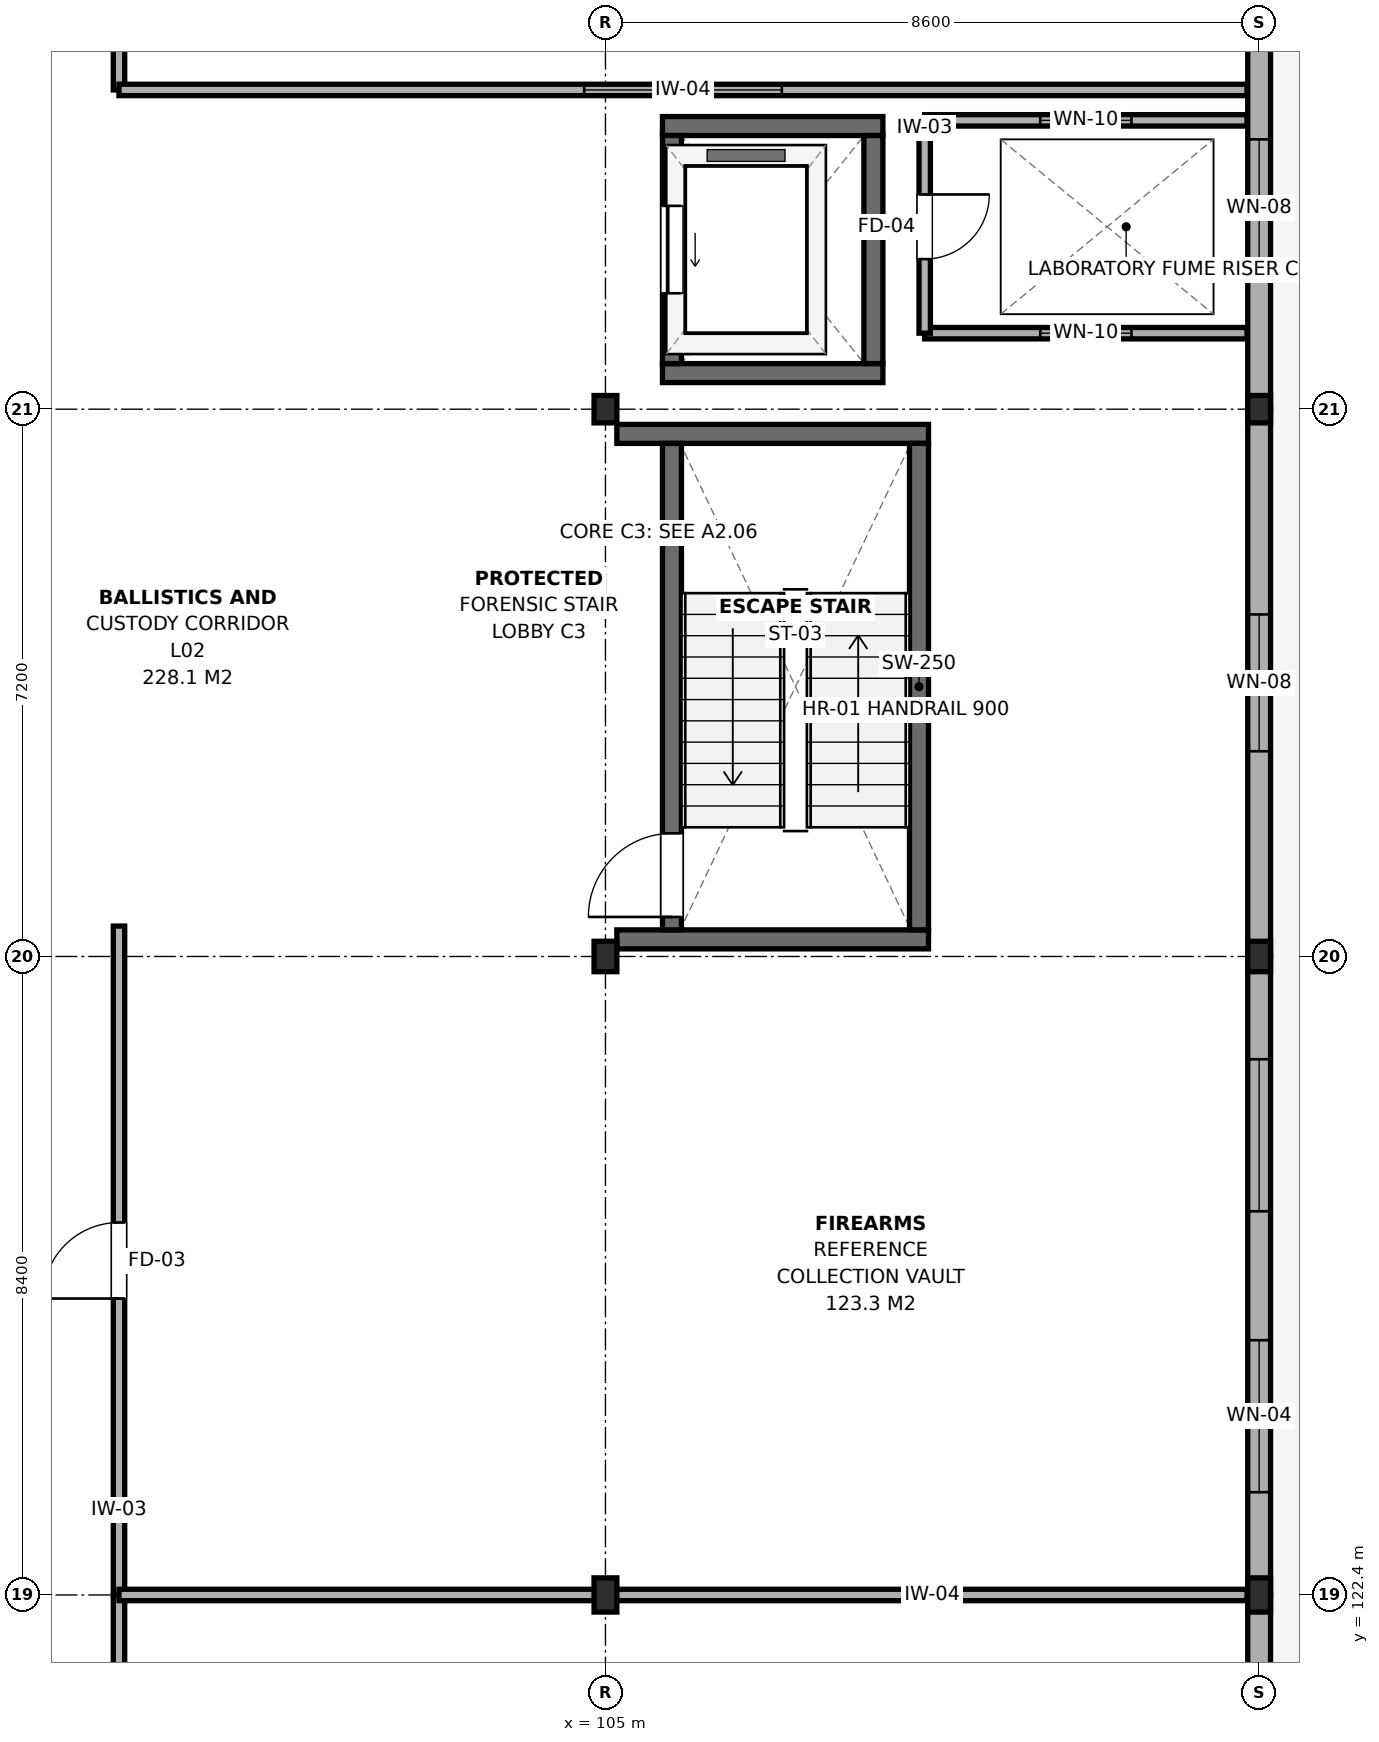
"""IFC4 building model, lengths in metres.
Left out: names, types, materials, properties, quantities, classifications, styles, units other than length and angle.
Written with IfcOpenShell. Run it as: python <this file> out.ifc"""

import sys

from ifc_helpers import new_model, si_unit, direction, frame, frame_2d, origin, origin_2d, place, context, subcontext, project, spatial, rectangle, i_section, extrude, element, fill, save


model = new_model("IFC4")
c1 = context("Model", 3, precision=1e-05, world=origin(), true_north=direction((0.0, 1.0)))
c2 = subcontext(c1, "Body", "Model", "MODEL_VIEW")
j1 = project(units=[si_unit("LENGTHUNIT", "METRE"), si_unit("PLANEANGLEUNIT", "RADIAN")], contexts=[c1])
p1 = place(None, origin())
s1 = spatial("IfcSite", under=j1, at=p1, CompositionType="ELEMENT")
p2 = place(p1, origin())
s2 = spatial("IfcBuilding", under=s1, at=p2, CompositionType="ELEMENT")
p3 = place(p2, frame((0.0, 0.0, 9.0)))
s3 = spatial("IfcBuildingStorey", under=s2, at=p3, CompositionType="ELEMENT", Elevation=9.0)
p4 = place(p3, frame((105.0, 122.4, 0.0), z_axis=(0.0, 0.0, 1.0), x_axis=(1.0, 0.0, 0.0)))
e1 = element("IfcColumn", 1, at=p4, inside=s3, PredefinedType="COLUMN", context=c2, shape_type="SweptSolid", body=[
    extrude(i_section(OverallWidth=0.3, OverallDepth=0.45, WebThickness=0.014, FlangeThickness=0.026, FilletRadius=0.027, at=origin_2d()), origin(), (0.0, 0.0, 1.0), 4.2),
])
p5 = place(p3, frame((105.0, 130.8, 0.0), z_axis=(0.0, 0.0, 1.0), x_axis=(1.0, 0.0, 0.0)))
e2 = element("IfcColumn", 2, at=p5, inside=s3, PredefinedType="COLUMN", context=c2, shape_type="SweptSolid", body=[
    extrude(i_section(OverallWidth=0.3, OverallDepth=0.4, WebThickness=0.013, FlangeThickness=0.024, FilletRadius=0.027, at=origin_2d()), origin(), (0.0, 0.0, 1.0), 4.2),
])
p6 = place(p3, frame((105.0, 138.0, 0.0), z_axis=(0.0, 0.0, 1.0), x_axis=(1.0, 0.0, 0.0)))
e3 = element("IfcColumn", 3, at=p6, inside=s3, PredefinedType="COLUMN", context=c2, shape_type="SweptSolid", body=[
    extrude(i_section(OverallWidth=0.3, OverallDepth=0.36, WebThickness=0.012, FlangeThickness=0.022, FilletRadius=0.027, at=origin_2d()), origin(), (0.0, 0.0, 1.0), 4.2),
])
p7 = place(p3, frame((113.6, 122.4, 0.0), z_axis=(0.0, 0.0, 1.0), x_axis=(1.0, 0.0, 0.0)))
e4 = element("IfcColumn", 4, at=p7, inside=s3, PredefinedType="COLUMN", context=c2, shape_type="SweptSolid", body=[
    extrude(i_section(OverallWidth=0.3, OverallDepth=0.45, WebThickness=0.014, FlangeThickness=0.026, FilletRadius=0.027, at=origin_2d()), origin(), (0.0, 0.0, 1.0), 4.2),
])
p8 = place(p3, frame((113.6, 130.8, 0.0), z_axis=(0.0, 0.0, 1.0), x_axis=(1.0, 0.0, 0.0)))
e5 = element("IfcColumn", 5, at=p8, inside=s3, PredefinedType="COLUMN", context=c2, shape_type="SweptSolid", body=[
    extrude(i_section(OverallWidth=0.3, OverallDepth=0.4, WebThickness=0.013, FlangeThickness=0.024, FilletRadius=0.027, at=origin_2d()), origin(), (0.0, 0.0, 1.0), 4.2),
])
p9 = place(p3, frame((113.6, 138.0, 0.0), z_axis=(0.0, 0.0, 1.0), x_axis=(1.0, 0.0, 0.0)))
e6 = element("IfcColumn", 6, at=p9, inside=s3, PredefinedType="COLUMN", context=c2, shape_type="SweptSolid", body=[
    extrude(i_section(OverallWidth=0.3, OverallDepth=0.36, WebThickness=0.012, FlangeThickness=0.022, FilletRadius=0.027, at=origin_2d()), origin(), (0.0, 0.0, 1.0), 4.2),
])
for number, where, z_axis, x_axis in (
    (7, (105.15, 131.025, 0.0), (0.0, 0.0, 1.0), (1.0, 0.0, 0.0)),
    (8, (105.15, 137.675, 0.0), (0.0, 0.0, 1.0), (1.0, 0.0, 0.0)),
):
    element("IfcWall", number, at=place(p3, frame(where, z_axis=z_axis, x_axis=x_axis)), inside=s3, PredefinedType="SHEAR", context=c2, shape_type="SweptSolid", body=[
        extrude(rectangle(XDim=4.1, YDim=0.25, at=frame_2d((2.05, 0.0))), origin(), (0.0, 0.0, 1.0), 3.98),
    ])
p10 = place(p3, frame((105.875, 131.15, 0.0), z_axis=(0.0, 0.0, 1.0), x_axis=(0.0, 1.0, 0.0)))
e9 = element("IfcWall", 9, at=p10, inside=s3, PredefinedType="SHEAR", context=c2, shape_type="SweptSolid", body=[
    extrude(rectangle(XDim=6.4, YDim=0.25, at=frame_2d((3.2, 0.0))), origin(), (0.0, 0.0, 1.0), 3.98),
])
p11 = place(p10, frame((0.17, 0.0, 0.0)))
e10 = element("IfcOpeningElement", 10, at=p11, cuts=e9, PredefinedType="OPENING", context=c2, shape_type="SweptSolid", body=[
    extrude(rectangle(XDim=1.1, YDim=2.15, at=frame_2d((0.55, 1.075))), frame((0.0, 0.14, 0.0), z_axis=(0.0, -1.0, 0.0), x_axis=(1.0, 0.0, 0.0)), (0.0, 0.0, 1.0), 0.28),
])
p12 = place(p3, frame((109.125, 131.15, 0.0), z_axis=(0.0, 0.0, 1.0), x_axis=(0.0, 1.0, 0.0)))
e11 = element("IfcWall", 11, at=p12, inside=s3, PredefinedType="SHEAR", context=c2, shape_type="SweptSolid", body=[
    extrude(rectangle(XDim=6.4, YDim=0.25, at=frame_2d((3.2, 0.0))), origin(), (0.0, 0.0, 1.0), 3.98),
])
for number, where, z_axis, x_axis in (
    (12, (105.75, 138.475, 0.0), (0.0, 0.0, 1.0), (1.0, 0.0, 0.0)),
    (13, (105.75, 141.725, 0.0), (0.0, 0.0, 1.0), (1.0, 0.0, 0.0)),
):
    element("IfcWall", number, at=place(p3, frame(where, z_axis=z_axis, x_axis=x_axis)), inside=s3, PredefinedType="SHEAR", context=c2, shape_type="SweptSolid", body=[
        extrude(rectangle(XDim=2.9, YDim=0.25, at=frame_2d((1.45, 0.0))), origin(), (0.0, 0.0, 1.0), 3.98),
    ])
p13 = place(p3, frame((105.875, 138.6, 0.0), z_axis=(0.0, 0.0, 1.0), x_axis=(0.0, 1.0, 0.0)))
e14 = element("IfcWall", 14, at=p13, inside=s3, PredefinedType="SHEAR", context=c2, shape_type="SweptSolid", body=[
    extrude(rectangle(XDim=3.0, YDim=0.25, at=frame_2d((1.5, 0.0))), origin(), (0.0, 0.0, 1.0), 3.98),
])
p14 = place(p13, frame((0.925, 0.0, 0.0)))
e15 = element("IfcOpeningElement", 15, at=p14, cuts=e14, PredefinedType="OPENING", context=c2, shape_type="SweptSolid", body=[
    extrude(rectangle(XDim=1.15, YDim=2.15, at=frame_2d((0.575, 1.075))), frame((0.0, 0.14, 0.0), z_axis=(0.0, -1.0, 0.0), x_axis=(1.0, 0.0, 0.0)), (0.0, 0.0, 1.0), 0.28),
])
p15 = place(p3, frame((108.525, 138.6, 0.0), z_axis=(0.0, 0.0, 1.0), x_axis=(0.0, 1.0, 0.0)))
e16 = element("IfcWall", 16, at=p15, inside=s3, PredefinedType="SHEAR", context=c2, shape_type="SweptSolid", body=[
    extrude(rectangle(XDim=3.0, YDim=0.25, at=frame_2d((1.5, 0.0))), origin(), (0.0, 0.0, 1.0), 3.98),
])
p16 = place(p3, frame((113.6, 113.4, 0.0), z_axis=(0.0, 0.0, 1.0), x_axis=(0.0, 1.0, 0.0)))
e17 = element("IfcWall", 17, at=p16, inside=s3, PredefinedType="SOLIDWALL", context=c2, shape_type="SweptSolid", body=[
    extrude(rectangle(XDim=9.0, YDim=0.3, at=frame_2d((4.5, 0.0))), origin(), (0.0, 0.0, 1.0), 3.535),
])
p17 = place(p16, frame((1.52, 0.0, 1.1)))
e18 = element("IfcOpeningElement", 18, at=p17, cuts=e17, PredefinedType="OPENING", context=c2, shape_type="SweptSolid", body=[
    extrude(rectangle(XDim=2.0, YDim=1.8, at=frame_2d((1.0, 0.9))), frame((0.0, 0.165, 0.0), z_axis=(0.0, -1.0, 0.0), x_axis=(1.0, 0.0, 0.0)), (0.0, 0.0, 1.0), 0.33),
])
p18 = place(p16, frame((5.48, 0.0, 1.1)))
e19 = element("IfcOpeningElement", 19, at=p18, cuts=e17, PredefinedType="OPENING", context=c2, shape_type="SweptSolid", body=[
    extrude(rectangle(XDim=2.0, YDim=1.8, at=frame_2d((1.0, 0.9))), frame((0.0, 0.165, 0.0), z_axis=(0.0, -1.0, 0.0), x_axis=(1.0, 0.0, 0.0)), (0.0, 0.0, 1.0), 0.33),
])
p19 = place(p3, frame((113.6, 122.4, 0.0), z_axis=(0.0, 0.0, 1.0), x_axis=(0.0, 1.0, 0.0)))
e20 = element("IfcWall", 20, at=p19, inside=s3, PredefinedType="SOLIDWALL", context=c2, shape_type="SweptSolid", body=[
    extrude(rectangle(XDim=8.4, YDim=0.3, at=frame_2d((4.2, 0.0))), origin(), (0.0, 0.0, 1.0), 3.585),
])
p20 = place(p19, frame((1.352, 0.0, 1.1)))
e21 = element("IfcOpeningElement", 21, at=p20, cuts=e20, PredefinedType="OPENING", context=c2, shape_type="SweptSolid", body=[
    extrude(rectangle(XDim=2.0, YDim=1.8, at=frame_2d((1.0, 0.9))), frame((0.0, 0.165, 0.0), z_axis=(0.0, -1.0, 0.0), x_axis=(1.0, 0.0, 0.0)), (0.0, 0.0, 1.0), 0.33),
])
p21 = place(p19, frame((5.048, 0.0, 1.1)))
e22 = element("IfcOpeningElement", 22, at=p21, cuts=e20, PredefinedType="OPENING", context=c2, shape_type="SweptSolid", body=[
    extrude(rectangle(XDim=2.0, YDim=1.8, at=frame_2d((1.0, 0.9))), frame((0.0, 0.165, 0.0), z_axis=(0.0, -1.0, 0.0), x_axis=(1.0, 0.0, 0.0)), (0.0, 0.0, 1.0), 0.33),
])
p22 = place(p3, frame((113.6, 130.8, 0.0), z_axis=(0.0, 0.0, 1.0), x_axis=(0.0, 1.0, 0.0)))
e23 = element("IfcWall", 23, at=p22, inside=s3, PredefinedType="SOLIDWALL", context=c2, shape_type="SweptSolid", body=[
    extrude(rectangle(XDim=7.2, YDim=0.3, at=frame_2d((3.6, 0.0))), origin(), (0.0, 0.0, 1.0), 3.625),
])
p23 = place(p22, frame((2.7, 0.0, 1.1)))
e24 = element("IfcOpeningElement", 24, at=p23, cuts=e23, PredefinedType="OPENING", context=c2, shape_type="SweptSolid", body=[
    extrude(rectangle(XDim=1.8, YDim=1.2, at=frame_2d((0.9, 0.6))), frame((0.0, 0.165, 0.0), z_axis=(0.0, -1.0, 0.0), x_axis=(1.0, 0.0, 0.0)), (0.0, 0.0, 1.0), 0.33),
])
p24 = place(p3, frame((113.6, 138.0, 0.0), z_axis=(0.0, 0.0, 1.0), x_axis=(0.0, 1.0, 0.0)))
e25 = element("IfcWall", 25, at=p24, inside=s3, PredefinedType="SOLIDWALL", context=c2, shape_type="SweptSolid", body=[
    extrude(rectangle(XDim=7.2, YDim=0.3, at=frame_2d((3.6, 0.0))), origin(), (0.0, 0.0, 1.0), 3.375),
])
p25 = place(p24, frame((1.75, 0.0, 1.1)))
e26 = element("IfcOpeningElement", 26, at=p25, cuts=e25, PredefinedType="OPENING", context=c2, shape_type="SweptSolid", body=[
    extrude(rectangle(XDim=1.8, YDim=1.2, at=frame_2d((0.9, 0.6))), frame((0.0, 0.165, 0.0), z_axis=(0.0, -1.0, 0.0), x_axis=(1.0, 0.0, 0.0)), (0.0, 0.0, 1.0), 0.33),
])
p26 = place(p3, frame((109.2, 139.0, 0.0), z_axis=(0.0, 0.0, 1.0), x_axis=(1.0, 0.0, 0.0)))
e27 = element("IfcWall", 27, at=p26, inside=s3, PredefinedType="PARTITIONING", context=c2, shape_type="SweptSolid", body=[
    extrude(rectangle(XDim=4.24, YDim=0.15, at=frame_2d((2.12, 0.0))), origin(), (0.0, 0.0, 1.0), 3.645),
])
p27 = place(p26, frame((1.52, 0.0, 0.95)))
e28 = element("IfcOpeningElement", 28, at=p27, cuts=e27, PredefinedType="OPENING", context=c2, shape_type="SweptSolid", body=[
    extrude(rectangle(XDim=1.2, YDim=1.5, at=frame_2d((0.6, 0.75))), frame((0.0, 0.09, 0.0), z_axis=(0.0, -1.0, 0.0), x_axis=(1.0, 0.0, 0.0)), (0.0, 0.0, 1.0), 0.18),
])
p28 = place(p3, frame((109.2, 141.8, 0.0), z_axis=(0.0, 0.0, 1.0), x_axis=(1.0, 0.0, 0.0)))
e29 = element("IfcWall", 29, at=p28, inside=s3, PredefinedType="PARTITIONING", context=c2, shape_type="SweptSolid", body=[
    extrude(rectangle(XDim=4.24, YDim=0.15, at=frame_2d((2.12, 0.0))), origin(), (0.0, 0.0, 1.0), 3.645),
])
p29 = place(p28, frame((1.52, 0.0, 0.95)))
e30 = element("IfcOpeningElement", 30, at=p29, cuts=e29, PredefinedType="OPENING", context=c2, shape_type="SweptSolid", body=[
    extrude(rectangle(XDim=1.2, YDim=1.5, at=frame_2d((0.6, 0.75))), frame((0.0, 0.09, 0.0), z_axis=(0.0, -1.0, 0.0), x_axis=(1.0, 0.0, 0.0)), (0.0, 0.0, 1.0), 0.18),
])
p30 = place(p3, frame((109.2, 139.0, 0.0), z_axis=(0.0, 0.0, 1.0), x_axis=(0.0, 1.0, 0.0)))
e31 = element("IfcWall", 31, at=p30, inside=s3, PredefinedType="PARTITIONING", context=c2, shape_type="SweptSolid", body=[
    extrude(rectangle(XDim=2.8, YDim=0.15, at=frame_2d((1.4, 0.0))), origin(), (0.0, 0.0, 1.0), 3.975),
])
p31 = place(p30, frame((0.975, 0.0, 0.0)))
e32 = element("IfcOpeningElement", 32, at=p31, cuts=e31, PredefinedType="OPENING", context=c2, shape_type="SweptSolid", body=[
    extrude(rectangle(XDim=0.85, YDim=2.1, at=frame_2d((0.425, 1.05))), frame((0.0, 0.09, 0.0), z_axis=(0.0, -1.0, 0.0), x_axis=(1.0, 0.0, 0.0)), (0.0, 0.0, 1.0), 0.18),
])
p32 = place(p3, frame((98.6, 118.0, 0.0), z_axis=(0.0, 0.0, 1.0), x_axis=(0.0, 1.0, 0.0)))
e33 = element("IfcWall", 33, at=p32, inside=s3, PredefinedType="PARTITIONING", context=c2, shape_type="SweptSolid", body=[
    extrude(rectangle(XDim=4.4, YDim=0.15, at=frame_2d((2.2, 0.0))), origin(), (0.0, 0.0, 1.0), 3.385),
])
p33 = place(p32, frame((1.675, 0.0, 0.0)))
e34 = element("IfcOpeningElement", 34, at=p33, cuts=e33, PredefinedType="OPENING", context=c2, shape_type="SweptSolid", body=[
    extrude(rectangle(XDim=1.05, YDim=2.15, at=frame_2d((0.525, 1.075))), frame((0.0, 0.09, 0.0), z_axis=(0.0, -1.0, 0.0), x_axis=(1.0, 0.0, 0.0)), (0.0, 0.0, 1.0), 0.18),
])
p34 = place(p3, frame((98.6, 122.4, 0.0), z_axis=(0.0, 0.0, 1.0), x_axis=(0.0, 1.0, 0.0)))
e35 = element("IfcWall", 35, at=p34, inside=s3, PredefinedType="PARTITIONING", context=c2, shape_type="SweptSolid", body=[
    extrude(rectangle(XDim=8.8, YDim=0.15, at=frame_2d((4.4, 0.0))), origin(), (0.0, 0.0, 1.0), 3.385),
])
p35 = place(p34, frame((3.9, 0.0, 0.0)))
e36 = element("IfcOpeningElement", 36, at=p35, cuts=e35, PredefinedType="OPENING", context=c2, shape_type="SweptSolid", body=[
    extrude(rectangle(XDim=1.0, YDim=2.15, at=frame_2d((0.5, 1.075))), frame((0.0, 0.09, 0.0), z_axis=(0.0, -1.0, 0.0), x_axis=(1.0, 0.0, 0.0)), (0.0, 0.0, 1.0), 0.18),
])
p36 = place(p3, frame((98.6, 122.4, 0.0), z_axis=(0.0, 0.0, 1.0), x_axis=(1.0, 0.0, 0.0)))
e37 = element("IfcWall", 37, at=p36, inside=s3, PredefinedType="PARTITIONING", context=c2, shape_type="SweptSolid", body=[
    extrude(rectangle(XDim=14.84, YDim=0.15, at=frame_2d((7.42, 0.0))), origin(), (0.0, 0.0, 1.0), 3.385),
])
p37 = place(p3, frame((98.6, 142.2, 0.0), z_axis=(0.0, 0.0, 1.0), x_axis=(0.0, 1.0, 0.0)))
e38 = element("IfcWall", 38, at=p37, inside=s3, PredefinedType="PARTITIONING", context=c2, shape_type="SweptSolid", body=[
    extrude(rectangle(XDim=13.8, YDim=0.15, at=frame_2d((6.9, 0.0))), origin(), (0.0, 0.0, 1.0), 3.435),
])
p38 = place(p37, frame((6.375, 0.0, 0.0)))
e39 = element("IfcOpeningElement", 39, at=p38, cuts=e38, PredefinedType="OPENING", context=c2, shape_type="SweptSolid", body=[
    extrude(rectangle(XDim=1.05, YDim=2.15, at=frame_2d((0.525, 1.075))), frame((0.0, 0.09, 0.0), z_axis=(0.0, -1.0, 0.0), x_axis=(1.0, 0.0, 0.0)), (0.0, 0.0, 1.0), 0.18),
])
p39 = place(p37, frame((8.636, 0.0, 0.95)))
e40 = element("IfcOpeningElement", 40, at=p39, cuts=e38, PredefinedType="OPENING", context=c2, shape_type="SweptSolid", body=[
    extrude(rectangle(XDim=2.6, YDim=1.5, at=frame_2d((1.3, 0.75))), frame((0.0, 0.09, 0.0), z_axis=(0.0, -1.0, 0.0), x_axis=(1.0, 0.0, 0.0)), (0.0, 0.0, 1.0), 0.18),
])
p40 = place(p3, frame((98.6, 142.2, 0.0), z_axis=(0.0, 0.0, 1.0), x_axis=(1.0, 0.0, 0.0)))
e41 = element("IfcWall", 41, at=p40, inside=s3, PredefinedType="PARTITIONING", context=c2, shape_type="SweptSolid", body=[
    extrude(rectangle(XDim=14.84, YDim=0.15, at=frame_2d((7.42, 0.0))), origin(), (0.0, 0.0, 1.0), 3.475),
])
p41 = place(p40, frame((6.12, 0.0, 0.95)))
e42 = element("IfcOpeningElement", 42, at=p41, cuts=e41, PredefinedType="OPENING", context=c2, shape_type="SweptSolid", body=[
    extrude(rectangle(XDim=2.6, YDim=1.5, at=frame_2d((1.3, 0.75))), frame((0.0, 0.09, 0.0), z_axis=(0.0, -1.0, 0.0), x_axis=(1.0, 0.0, 0.0)), (0.0, 0.0, 1.0), 0.18),
])
p42 = place(p20, origin())
e43 = element("IfcWindow", 43, at=p42, inside=s3, PartitioningType="SINGLE_PANEL", PredefinedType="WINDOW", context=c2, shape_type="SweptSolid", body=[
    extrude(rectangle(XDim=2.0, YDim=1.8, at=frame_2d((1.0, 0.9))), frame((0.0, 0.03, 0.0), z_axis=(0.0, -1.0, 0.0), x_axis=(1.0, 0.0, 0.0)), (0.0, 0.0, 1.0), 0.06),
])
fill(e21, e43)
p43 = place(p21, origin())
e44 = element("IfcWindow", 44, at=p43, inside=s3, PartitioningType="SINGLE_PANEL", PredefinedType="WINDOW", context=c2, shape_type="SweptSolid", body=[
    extrude(rectangle(XDim=2.0, YDim=1.8, at=frame_2d((1.0, 0.9))), frame((0.0, 0.03, 0.0), z_axis=(0.0, -1.0, 0.0), x_axis=(1.0, 0.0, 0.0)), (0.0, 0.0, 1.0), 0.06),
])
fill(e22, e44)
p44 = place(p23, origin())
e45 = element("IfcWindow", 45, at=p44, inside=s3, PartitioningType="SINGLE_PANEL", PredefinedType="WINDOW", context=c2, shape_type="SweptSolid", body=[
    extrude(rectangle(XDim=1.8, YDim=1.2, at=frame_2d((0.9, 0.6))), frame((0.0, 0.03, 0.0), z_axis=(0.0, -1.0, 0.0), x_axis=(1.0, 0.0, 0.0)), (0.0, 0.0, 1.0), 0.06),
])
fill(e24, e45)
p45 = place(p25, origin())
e46 = element("IfcWindow", 46, at=p45, inside=s3, PartitioningType="SINGLE_PANEL", PredefinedType="WINDOW", context=c2, shape_type="SweptSolid", body=[
    extrude(rectangle(XDim=1.8, YDim=1.2, at=frame_2d((0.9, 0.6))), frame((0.0, 0.03, 0.0), z_axis=(0.0, -1.0, 0.0), x_axis=(1.0, 0.0, 0.0)), (0.0, 0.0, 1.0), 0.06),
])
fill(e26, e46)
p46 = place(p11, origin())
e47 = element("IfcDoor", 47, at=p46, inside=s3, OperationType="SINGLE_SWING_LEFT", PredefinedType="DOOR", context=c2, shape_type="SweptSolid", body=[
    extrude(rectangle(XDim=1.1, YDim=2.15, at=frame_2d((0.55, 1.075))), frame((0.0, 0.025, 0.0), z_axis=(0.0, -1.0, 0.0), x_axis=(1.0, 0.0, 0.0)), (0.0, 0.0, 1.0), 0.05),
])
fill(e10, e47)
p47 = place(p14, origin())
e48 = element("IfcDoor", 48, at=p47, inside=s3, OperationType="SLIDING_TO_LEFT", PredefinedType="DOOR", context=c2, shape_type="SweptSolid", body=[
    extrude(rectangle(XDim=1.15, YDim=2.15, at=frame_2d((0.575, 1.075))), frame((0.0, 0.025, 0.0), z_axis=(0.0, -1.0, 0.0), x_axis=(1.0, 0.0, 0.0)), (0.0, 0.0, 1.0), 0.05),
])
fill(e15, e48)
p48 = place(p27, origin())
e49 = element("IfcWindow", 49, at=p48, inside=s3, PartitioningType="SINGLE_PANEL", PredefinedType="WINDOW", context=c2, shape_type="SweptSolid", body=[
    extrude(rectangle(XDim=1.2, YDim=1.5, at=frame_2d((0.6, 0.75))), frame((0.0, 0.03, 0.0), z_axis=(0.0, -1.0, 0.0), x_axis=(1.0, 0.0, 0.0)), (0.0, 0.0, 1.0), 0.06),
])
fill(e28, e49)
p49 = place(p29, origin())
e50 = element("IfcWindow", 50, at=p49, inside=s3, PartitioningType="SINGLE_PANEL", PredefinedType="WINDOW", context=c2, shape_type="SweptSolid", body=[
    extrude(rectangle(XDim=1.2, YDim=1.5, at=frame_2d((0.6, 0.75))), frame((0.0, 0.03, 0.0), z_axis=(0.0, -1.0, 0.0), x_axis=(1.0, 0.0, 0.0)), (0.0, 0.0, 1.0), 0.06),
])
fill(e30, e50)
p50 = place(p31, frame((0.85, 0.0, 0.0), z_axis=(0.0, 0.0, 1.0), x_axis=(-1.0, 0.0, 0.0)))
e51 = element("IfcDoor", 51, at=p50, inside=s3, OperationType="SINGLE_SWING_LEFT", PredefinedType="DOOR", context=c2, shape_type="SweptSolid", body=[
    extrude(rectangle(XDim=0.85, YDim=2.1, at=frame_2d((0.425, 1.05))), frame((0.0, 0.025, 0.0), z_axis=(0.0, -1.0, 0.0), x_axis=(1.0, 0.0, 0.0)), (0.0, 0.0, 1.0), 0.05),
])
fill(e32, e51)
p51 = place(p35, origin())
e52 = element("IfcDoor", 52, at=p51, inside=s3, OperationType="SINGLE_SWING_LEFT", PredefinedType="DOOR", context=c2, shape_type="SweptSolid", body=[
    extrude(rectangle(XDim=1.0, YDim=2.15, at=frame_2d((0.5, 1.075))), frame((0.0, 0.025, 0.0), z_axis=(0.0, -1.0, 0.0), x_axis=(1.0, 0.0, 0.0)), (0.0, 0.0, 1.0), 0.05),
])
fill(e36, e52)
p52 = place(p41, origin())
e53 = element("IfcWindow", 53, at=p52, inside=s3, PartitioningType="SINGLE_PANEL", PredefinedType="WINDOW", context=c2, shape_type="SweptSolid", body=[
    extrude(rectangle(XDim=2.6, YDim=1.5, at=frame_2d((1.3, 0.75))), frame((0.0, 0.03, 0.0), z_axis=(0.0, -1.0, 0.0), x_axis=(1.0, 0.0, 0.0)), (0.0, 0.0, 1.0), 0.06),
])
fill(e42, e53)
save(model, sys.argv[1])
